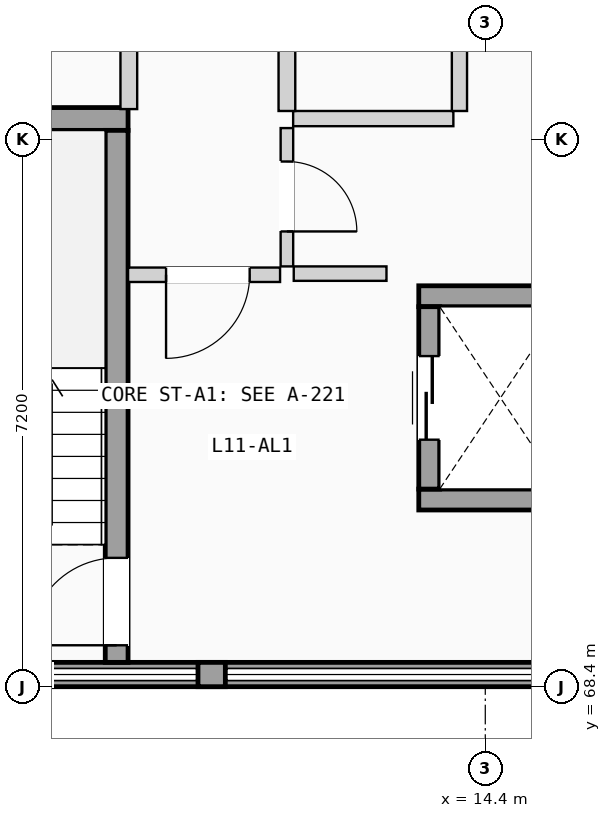
"""IFC4 building model, lengths in metres.
Left out: names, types, materials, properties, quantities, classifications, styles, units other than length and angle.
Written with IfcOpenShell. Run it as: python <this file> out.ifc"""

import sys

from ifc_helpers import new_model, si_unit, direction, frame, frame_2d, origin, place, context, subcontext, project, spatial, rectangle, extrude, element, fill, save


model = new_model("IFC4")
c1 = context("Model", 3, precision=1e-05, world=origin(), true_north=direction((0.0, 1.0)))
c2 = subcontext(c1, "Body", "Model", "MODEL_VIEW")
j1 = project(units=[si_unit("LENGTHUNIT", "METRE"), si_unit("PLANEANGLEUNIT", "RADIAN")], contexts=[c1])
p1 = place(None, origin())
s1 = spatial("IfcSite", under=j1, at=p1, CompositionType="ELEMENT")
p2 = place(p1, origin())
s2 = spatial("IfcBuilding", under=s1, at=p2, CompositionType="ELEMENT")
p3 = place(p2, frame((0.0, 0.0, 37.275)))
s3 = spatial("IfcBuildingStorey", under=s2, at=p3, CompositionType="ELEMENT", Elevation=37.275)
p4 = place(p3, frame((1.8, 68.56, 0.0), z_axis=(0.0, 0.0, 1.0), x_axis=(1.0, 0.0, 0.0)))
e1 = element("IfcWall", 1, at=p4, inside=s3, PredefinedType="SOLIDWALL", context=c2, shape_type="SweptSolid", body=[
    extrude(rectangle(XDim=18.0, YDim=0.32, at=frame_2d((9.0, 0.0))), origin(), (0.0, 0.0, 1.0), 1.11),
])
p5 = place(p3, frame((10.62, 68.56, 1.11), z_axis=(0.0, 0.0, 1.0), x_axis=(1.0, 0.0, 0.0)))
e2 = element("IfcWall", 2, at=p5, inside=s3, PredefinedType="SOLIDWALL", context=c2, shape_type="SweptSolid", body=[
    extrude(rectangle(XDim=0.36, YDim=0.32, at=frame_2d((0.18, 0.0))), origin(), (0.0, 0.0, 1.0), 1.79),
])
p6 = place(p3, frame((5.65, 75.87, 0.0), z_axis=(0.0, 0.0, 1.0), x_axis=(1.0, 0.0, 0.0)))
e3 = element("IfcWall", 3, at=p6, inside=s3, PredefinedType="SHEAR", context=c2, shape_type="SweptSolid", body=[
    extrude(rectangle(XDim=4.05, YDim=0.3, at=frame_2d((2.025, 0.0))), origin(), (0.0, 0.0, 1.0), 2.9),
])
p7 = place(p3, frame((9.55, 68.72, 0.0), z_axis=(0.0, 0.0, 1.0), x_axis=(0.0, 1.0, 0.0)))
e4 = element("IfcWall", 4, at=p7, inside=s3, PredefinedType="SHEAR", context=c2, shape_type="SweptSolid", body=[
    extrude(rectangle(XDim=7.0, YDim=0.3, at=frame_2d((3.5, 0.0))), origin(), (0.0, 0.0, 1.0), 2.9),
])
p8 = place(p7, frame((0.225, 0.0, 0.0)))
e5 = element("IfcOpeningElement", 5, at=p8, cuts=e4, PredefinedType="OPENING", context=c2, shape_type="SweptSolid", body=[
    extrude(rectangle(XDim=1.15, YDim=2.12, at=frame_2d((0.575, 1.06))), frame((0.0, 0.16, 0.0), z_axis=(0.0, -1.0, 0.0), x_axis=(1.0, 0.0, 0.0)), (0.0, 0.0, 1.0), 0.32),
])
for number, where, z_axis, x_axis in (
    (6, (13.525, 70.863, 0.0), (0.0, 0.0, 1.0), (1.0, 0.0, 0.0)),
    (7, (13.525, 73.538, 0.0), (0.0, 0.0, 1.0), (1.0, 0.0, 0.0)),
):
    element("IfcWall", number, at=place(p3, frame(where, z_axis=z_axis, x_axis=x_axis)), inside=s3, PredefinedType="SHEAR", context=c2, shape_type="SweptSolid", body=[
        extrude(rectangle(XDim=2.15, YDim=0.275, at=frame_2d((1.075, 0.0))), origin(), (0.0, 0.0, 1.0), 2.9),
    ])
p9 = place(p3, frame((13.663, 71.0, 0.0), z_axis=(0.0, 0.0, 1.0), x_axis=(0.0, 1.0, 0.0)))
e8 = element("IfcWall", 8, at=p9, inside=s3, PredefinedType="SHEAR", context=c2, shape_type="SweptSolid", body=[
    extrude(rectangle(XDim=2.4, YDim=0.275, at=frame_2d((1.2, 0.0))), origin(), (0.0, 0.0, 1.0), 2.9),
])
p10 = place(p9, frame((0.65, 0.0, 0.0)))
e9 = element("IfcOpeningElement", 9, at=p10, cuts=e8, PredefinedType="OPENING", context=c2, shape_type="SweptSolid", body=[
    extrude(rectangle(XDim=1.1, YDim=2.15, at=frame_2d((0.55, 1.075))), frame((0.0, 0.147, 0.0), z_axis=(0.0, -1.0, 0.0), x_axis=(1.0, 0.0, 0.0)), (0.0, 0.0, 1.0), 0.295),
])
p11 = place(p3, frame((11.88, 73.835, 0.0), z_axis=(0.0, 0.0, 1.0), x_axis=(1.0, 0.0, 0.0)))
e10 = element("IfcWall", 10, at=p11, inside=s3, PredefinedType="PARTITIONING", context=c2, shape_type="SweptSolid", body=[
    extrude(rectangle(XDim=1.22, YDim=0.19, at=frame_2d((0.61, 0.0))), origin(), (0.0, 0.0, 1.0), 2.87),
])
p12 = place(p3, frame((9.7, 73.82, 0.0), z_axis=(0.0, 0.0, 1.0), x_axis=(1.0, 0.0, 0.0)))
e11 = element("IfcWall", 11, at=p12, inside=s3, PredefinedType="PARTITIONING", context=c2, shape_type="SweptSolid", body=[
    extrude(rectangle(XDim=2.0, YDim=0.19, at=frame_2d((1.0, 0.0))), origin(), (0.0, 0.0, 1.0), 2.87),
])
p13 = place(p12, frame((0.5, 0.0, 0.0)))
e12 = element("IfcOpeningElement", 12, at=p13, cuts=e11, PredefinedType="OPENING", context=c2, shape_type="SweptSolid", body=[
    extrude(rectangle(XDim=1.1, YDim=2.12, at=frame_2d((0.55, 1.06))), frame((0.0, 0.105, 0.0), z_axis=(0.0, -1.0, 0.0), x_axis=(1.0, 0.0, 0.0)), (0.0, 0.0, 1.0), 0.21),
])
p14 = place(p3, frame((11.79, 73.93, 0.0), z_axis=(0.0, 0.0, 1.0), x_axis=(0.0, 1.0, 0.0)))
e13 = element("IfcWall", 13, at=p14, inside=s3, PredefinedType="PARTITIONING", context=c2, shape_type="SweptSolid", body=[
    extrude(rectangle(XDim=1.82, YDim=0.165, at=frame_2d((0.91, 0.0))), origin(), (0.0, 0.0, 1.0), 2.87),
])
p15 = place(p14, frame((0.46, 0.0, 0.0)))
e14 = element("IfcOpeningElement", 14, at=p15, cuts=e13, PredefinedType="OPENING", context=c2, shape_type="SweptSolid", body=[
    extrude(rectangle(XDim=0.92, YDim=2.04, at=frame_2d((0.46, 1.02))), frame((0.0, 0.093, 0.0), z_axis=(0.0, -1.0, 0.0), x_axis=(1.0, 0.0, 0.0)), (0.0, 0.0, 1.0), 0.185),
])
p16 = place(p3, frame((11.872, 75.875, 0.0), z_axis=(0.0, 0.0, 1.0), x_axis=(1.0, 0.0, 0.0)))
e15 = element("IfcWall", 15, at=p16, inside=s3, PredefinedType="PLUMBINGWALL", context=c2, shape_type="SweptSolid", body=[
    extrude(rectangle(XDim=2.108, YDim=0.2, at=frame_2d((1.054, 0.0))), origin(), (0.0, 0.0, 1.0), 2.87),
])
p17 = place(p3, frame((9.71, 76.0, 0.0), z_axis=(0.0, 0.0, 1.0), x_axis=(0.0, 1.0, 0.0)))
e16 = element("IfcWall", 16, at=p17, inside=s3, PredefinedType="PLUMBINGWALL", context=c2, shape_type="SweptSolid", body=[
    extrude(rectangle(XDim=4.912, YDim=0.22, at=frame_2d((2.456, 0.0))), origin(), (0.0, 0.0, 1.0), 2.87),
])
p18 = place(p3, frame((11.79, 75.975, 0.0), z_axis=(0.0, 0.0, 1.0), x_axis=(0.0, 1.0, 0.0)))
e17 = element("IfcWall", 17, at=p18, inside=s3, PredefinedType="PLUMBINGWALL", context=c2, shape_type="SweptSolid", body=[
    extrude(rectangle(XDim=4.937, YDim=0.22, at=frame_2d((2.469, 0.0))), origin(), (0.0, 0.0, 1.0), 2.87),
])
p19 = place(p3, frame((14.06, 75.975, 0.0), z_axis=(0.0, 0.0, 1.0), x_axis=(0.0, 1.0, 0.0)))
e18 = element("IfcWall", 18, at=p19, inside=s3, PredefinedType="PLUMBINGWALL", context=c2, shape_type="SweptSolid", body=[
    extrude(rectangle(XDim=4.937, YDim=0.2, at=frame_2d((2.469, 0.0))), origin(), (0.0, 0.0, 1.0), 2.87),
])
p20 = place(p8, origin())
e19 = element("IfcDoor", 19, at=p20, inside=s3, OperationType="SINGLE_SWING_LEFT", PredefinedType="DOOR", context=c2, shape_type="SweptSolid", body=[
    extrude(rectangle(XDim=1.15, YDim=2.12, at=frame_2d((0.575, 1.06))), frame((0.0, 0.025, 0.0), z_axis=(0.0, -1.0, 0.0), x_axis=(1.0, 0.0, 0.0)), (0.0, 0.0, 1.0), 0.05),
])
fill(e5, e19)
p21 = place(p10, origin())
e20 = element("IfcDoor", 20, at=p21, inside=s3, OperationType="SLIDING_TO_LEFT", PredefinedType="DOOR", context=c2, shape_type="SweptSolid", body=[
    extrude(rectangle(XDim=1.1, YDim=2.15, at=frame_2d((0.55, 1.075))), frame((0.0, 0.025, 0.0), z_axis=(0.0, -1.0, 0.0), x_axis=(1.0, 0.0, 0.0)), (0.0, 0.0, 1.0), 0.05),
])
fill(e9, e20)
p22 = place(p13, frame((1.1, 0.0, 0.0), z_axis=(0.0, 0.0, 1.0), x_axis=(-1.0, 0.0, 0.0)))
e21 = element("IfcDoor", 21, at=p22, inside=s3, OperationType="SINGLE_SWING_LEFT", PredefinedType="DOOR", context=c2, shape_type="SweptSolid", body=[
    extrude(rectangle(XDim=1.1, YDim=2.12, at=frame_2d((0.55, 1.06))), frame((0.0, 0.025, 0.0), z_axis=(0.0, -1.0, 0.0), x_axis=(1.0, 0.0, 0.0)), (0.0, 0.0, 1.0), 0.05),
])
fill(e12, e21)
p23 = place(p15, frame((0.92, 0.0, 0.0), z_axis=(0.0, 0.0, 1.0), x_axis=(-1.0, 0.0, 0.0)))
e22 = element("IfcDoor", 22, at=p23, inside=s3, OperationType="SINGLE_SWING_LEFT", PredefinedType="DOOR", context=c2, shape_type="SweptSolid", body=[
    extrude(rectangle(XDim=0.92, YDim=2.04, at=frame_2d((0.46, 1.02))), frame((0.0, 0.025, 0.0), z_axis=(0.0, -1.0, 0.0), x_axis=(1.0, 0.0, 0.0)), (0.0, 0.0, 1.0), 0.05),
])
fill(e14, e22)
save(model, sys.argv[1])
